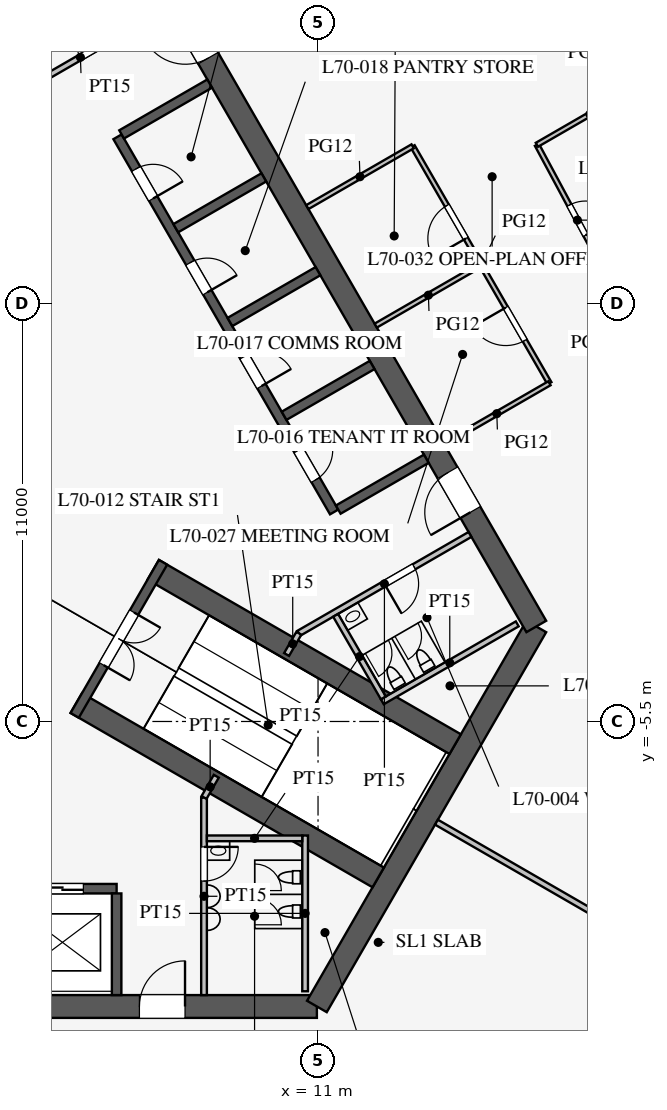
"""IFC4 building model, lengths in metres.
Left out: names, types, materials, properties, quantities, classifications, styles, units other than length and angle.
Written with IfcOpenShell. Run it as: python <this file> out.ifc"""

import sys

from ifc_helpers import new_model, si_unit, direction, frame, frame_2d, origin, place, context, subcontext, project, spatial, rectangle, extrude, element, fill, save


model = new_model("IFC4")
c1 = context("Model", 3, precision=1e-05, world=origin(), true_north=direction((0.0, 1.0)))
c2 = subcontext(c1, "Body", "Model", "MODEL_VIEW")
j1 = project(units=[si_unit("LENGTHUNIT", "METRE"), si_unit("PLANEANGLEUNIT", "RADIAN")], contexts=[c1])
p1 = place(None, origin())
s1 = spatial("IfcSite", under=j1, at=p1, CompositionType="ELEMENT")
p2 = place(p1, origin())
s2 = spatial("IfcBuilding", under=s1, at=p2, CompositionType="ELEMENT")
p3 = place(p2, frame((0.0, 0.0, 305.7)))
s3 = spatial("IfcBuildingStorey", under=s2, at=p3, CompositionType="ELEMENT", Elevation=305.7)
p4 = place(p3, frame((-10.97, -13.0, 0.0), z_axis=(0.0, 0.0, 1.0), x_axis=(1.0, 0.0, 0.0)))
e1 = element("IfcWall", 1, at=p4, inside=s3, PredefinedType="SHEAR", context=c2, shape_type="SweptSolid", body=[
    extrude(rectangle(XDim=21.939, YDim=0.6, at=frame_2d((10.97, 0.0))), origin(), (0.0, 0.0, 1.0), 4.2),
])
p5 = place(p4, frame((17.27, 0.0, 0.0)))
e2 = element("IfcOpeningElement", 2, at=p5, cuts=e1, PredefinedType="OPENING", context=c2, shape_type="SweptSolid", body=[
    extrude(rectangle(XDim=1.2, YDim=2.1, at=frame_2d((0.6, 1.05))), frame((0.0, 0.31, 0.0), z_axis=(0.0, -1.0, 0.0), x_axis=(1.0, 0.0, 0.0)), (0.0, 0.0, 1.0), 0.62),
])
p6 = place(p4, frame((3.47, 0.0, 0.0)))
e3 = element("IfcOpeningElement", 3, at=p6, cuts=e1, PredefinedType="OPENING", context=c2, shape_type="SweptSolid", body=[
    extrude(rectangle(XDim=1.2, YDim=2.1, at=frame_2d((0.6, 1.05))), frame((0.0, 0.31, 0.0), z_axis=(0.0, -1.0, 0.0), x_axis=(1.0, 0.0, 0.0)), (0.0, 0.0, 1.0), 0.62),
])
p7 = place(p3, frame((10.97, -13.0, 0.0), z_axis=(0.0, 0.0, 1.0), x_axis=(0.499995765644, 0.866027848477, 0.0)))
e4 = element("IfcWall", 4, at=p7, inside=s3, PredefinedType="SHEAR", context=c2, shape_type="SweptSolid", body=[
    extrude(rectangle(XDim=11.547, YDim=0.6, at=frame_2d((5.773, 0.0))), origin(), (0.0, 0.0, 1.0), 4.2),
])
p8 = place(p3, frame((16.743, -3.0, 0.0), z_axis=(0.0, 0.0, 1.0), x_axis=(-0.500002442456, 0.866023993627, 0.0)))
e5 = element("IfcWall", 5, at=p8, inside=s3, PredefinedType="SHEAR", context=c2, shape_type="SweptSolid", body=[
    extrude(rectangle(XDim=21.939, YDim=0.6, at=frame_2d((10.97, 0.0))), origin(), (0.0, 0.0, 1.0), 4.2),
])
p9 = place(p8, frame((17.27, 0.0, 0.0)))
e6 = element("IfcOpeningElement", 6, at=p9, cuts=e5, PredefinedType="OPENING", context=c2, shape_type="SweptSolid", body=[
    extrude(rectangle(XDim=1.2, YDim=2.1, at=frame_2d((0.6, 1.05))), frame((0.0, 0.31, 0.0), z_axis=(0.0, -1.0, 0.0), x_axis=(1.0, 0.0, 0.0)), (0.0, 0.0, 1.0), 0.62),
])
p10 = place(p8, frame((3.47, 0.0, 0.0)))
e7 = element("IfcOpeningElement", 7, at=p10, cuts=e5, PredefinedType="OPENING", context=c2, shape_type="SweptSolid", body=[
    extrude(rectangle(XDim=1.2, YDim=2.1, at=frame_2d((0.6, 1.05))), frame((0.0, 0.31, 0.0), z_axis=(0.0, -1.0, 0.0), x_axis=(1.0, 0.0, 0.0)), (0.0, 0.0, 1.0), 0.62),
])
p11 = place(p3, frame((-5.7, -9.9, 0.0), z_axis=(0.0, 0.0, 1.0), x_axis=(1.0, 0.0, 0.0)))
e8 = element("IfcWall", 8, at=p11, inside=s3, PredefinedType="SHEAR", context=c2, shape_type="SweptSolid", body=[
    extrude(rectangle(XDim=11.4, YDim=0.25, at=frame_2d((5.7, 0.0))), origin(), (0.0, 0.0, 1.0), 4.2),
])
p12 = place(p11, frame((0.875, 0.0, 0.0)))
e9 = element("IfcOpeningElement", 9, at=p12, cuts=e8, PredefinedType="OPENING", context=c2, shape_type="SweptSolid", body=[
    extrude(rectangle(XDim=1.1, YDim=2.2, at=frame_2d((0.55, 1.1))), frame((0.0, 0.135, 0.0), z_axis=(0.0, -1.0, 0.0), x_axis=(1.0, 0.0, 0.0)), (0.0, 0.0, 1.0), 0.27),
])
p13 = place(p11, frame((3.725, 0.0, 0.0)))
e10 = element("IfcOpeningElement", 10, at=p13, cuts=e8, PredefinedType="OPENING", context=c2, shape_type="SweptSolid", body=[
    extrude(rectangle(XDim=1.1, YDim=2.2, at=frame_2d((0.55, 1.1))), frame((0.0, 0.135, 0.0), z_axis=(0.0, -1.0, 0.0), x_axis=(1.0, 0.0, 0.0)), (0.0, 0.0, 1.0), 0.27),
])
p14 = place(p11, frame((6.575, 0.0, 0.0)))
e11 = element("IfcOpeningElement", 11, at=p14, cuts=e8, PredefinedType="OPENING", context=c2, shape_type="SweptSolid", body=[
    extrude(rectangle(XDim=1.1, YDim=2.2, at=frame_2d((0.55, 1.1))), frame((0.0, 0.135, 0.0), z_axis=(0.0, -1.0, 0.0), x_axis=(1.0, 0.0, 0.0)), (0.0, 0.0, 1.0), 0.27),
])
p15 = place(p11, frame((9.425, 0.0, 0.0)))
e12 = element("IfcOpeningElement", 12, at=p15, cuts=e8, PredefinedType="OPENING", context=c2, shape_type="SweptSolid", body=[
    extrude(rectangle(XDim=1.1, YDim=2.2, at=frame_2d((0.55, 1.1))), frame((0.0, 0.135, 0.0), z_axis=(0.0, -1.0, 0.0), x_axis=(1.0, 0.0, 0.0)), (0.0, 0.0, 1.0), 0.27),
])
p16 = place(p3, frame((5.7, -10.025, 0.0), z_axis=(0.0, 0.0, 1.0), x_axis=(0.0, -1.0, 0.0)))
e13 = element("IfcWall", 13, at=p16, inside=s3, PredefinedType="SHEAR", context=c2, shape_type="SweptSolid", body=[
    extrude(rectangle(XDim=2.675, YDim=0.25, at=frame_2d((1.337, 0.0))), origin(), (0.0, 0.0, 1.0), 4.2),
])
p17 = place(p3, frame((11.424, 0.014, 0.0), z_axis=(0.0, 0.0, 1.0), x_axis=(-0.500001763848, 0.866024385424, 0.0)))
e14 = element("IfcWall", 14, at=p17, inside=s3, PredefinedType="SHEAR", context=c2, shape_type="SweptSolid", body=[
    extrude(rectangle(XDim=11.4, YDim=0.25, at=frame_2d((5.7, 0.0))), origin(), (0.0, 0.0, 1.0), 4.2),
])
p18 = place(p17, frame((0.975, 0.0, 0.0)))
e15 = element("IfcOpeningElement", 15, at=p18, cuts=e14, PredefinedType="OPENING", context=c2, shape_type="SweptSolid", body=[
    extrude(rectangle(XDim=0.9, YDim=2.1, at=frame_2d((0.45, 1.05))), frame((0.0, 0.135, 0.0), z_axis=(0.0, -1.0, 0.0), x_axis=(1.0, 0.0, 0.0)), (0.0, 0.0, 1.0), 0.27),
])
p19 = place(p17, frame((3.825, 0.0, 0.0)))
e16 = element("IfcOpeningElement", 16, at=p19, cuts=e14, PredefinedType="OPENING", context=c2, shape_type="SweptSolid", body=[
    extrude(rectangle(XDim=0.9, YDim=2.1, at=frame_2d((0.45, 1.05))), frame((0.0, 0.135, 0.0), z_axis=(0.0, -1.0, 0.0), x_axis=(1.0, 0.0, 0.0)), (0.0, 0.0, 1.0), 0.27),
])
p20 = place(p17, frame((6.675, 0.0, 0.0)))
e17 = element("IfcOpeningElement", 17, at=p20, cuts=e14, PredefinedType="OPENING", context=c2, shape_type="SweptSolid", body=[
    extrude(rectangle(XDim=0.9, YDim=2.1, at=frame_2d((0.45, 1.05))), frame((0.0, 0.135, 0.0), z_axis=(0.0, -1.0, 0.0), x_axis=(1.0, 0.0, 0.0)), (0.0, 0.0, 1.0), 0.27),
])
p21 = place(p17, frame((9.525, 0.0, 0.0)))
e18 = element("IfcOpeningElement", 18, at=p21, cuts=e14, PredefinedType="OPENING", context=c2, shape_type="SweptSolid", body=[
    extrude(rectangle(XDim=0.9, YDim=2.1, at=frame_2d((0.45, 1.05))), frame((0.0, 0.135, 0.0), z_axis=(0.0, -1.0, 0.0), x_axis=(1.0, 0.0, 0.0)), (0.0, 0.0, 1.0), 0.27),
])
for number, where, z_axis, x_axis in (
    (19, (11.532, 0.076, 0.0), (0.0, 0.0, 1.0), (0.866, 0.5, 0.0)),
    (20, (10.107, 2.544, 0.0), (0.0, 0.0, 1.0), (0.866, 0.5, 0.0)),
    (21, (8.682, 5.012, 0.0), (0.0, 0.0, 1.0), (0.866, 0.5, 0.0)),
    (22, (7.257, 7.481, 0.0), (0.0, 0.0, 1.0), (0.866, 0.5, 0.0)),
    (23, (5.832, 9.949, 0.0), (0.0, 0.0, 1.0), (0.866, 0.5, 0.0)),
):
    element("IfcWall", number, at=place(p3, frame(where, z_axis=z_axis, x_axis=x_axis)), inside=s3, PredefinedType="SHEAR", context=c2, shape_type="SweptSolid", body=[
        extrude(rectangle(XDim=2.675, YDim=0.25, at=frame_2d((1.337, 0.0))), origin(), (0.0, 0.0, 1.0), 4.2),
    ])
p22 = place(p3, frame((4.638, -5.016, 0.0), z_axis=(0.0, 0.0, 1.0), x_axis=(0.866012320003, -0.50002266109, 0.0)))
e24 = element("IfcWall", 24, at=p22, inside=s3, PredefinedType="SHEAR", context=c2, shape_type="SweptSolid", body=[
    extrude(rectangle(XDim=9.175, YDim=0.6, at=frame_2d((4.587, 0.0))), origin(), (0.0, 0.0, 1.0), 4.2),
])
p23 = place(p3, frame((6.663, -1.509, 0.0), z_axis=(0.0, 0.0, 1.0), x_axis=(0.86603049496, -0.499991181721, 0.0)))
e25 = element("IfcWall", 25, at=p23, inside=s3, PredefinedType="SHEAR", context=c2, shape_type="SweptSolid", body=[
    extrude(rectangle(XDim=9.175, YDim=0.6, at=frame_2d((4.587, 0.0))), origin(), (0.0, 0.0, 1.0), 4.2),
])
p24 = place(p3, frame((4.597, -5.339, 0.0), z_axis=(0.0, 0.0, 1.0), x_axis=(0.499984536904, 0.866034331223, 0.0)))
e26 = element("IfcWall", 26, at=p24, inside=s3, PredefinedType="SHEAR", context=c2, shape_type="SweptSolid", body=[
    extrude(rectangle(XDim=4.65, YDim=0.25, at=frame_2d((2.325, 0.0))), origin(), (0.0, 0.0, 1.0), 4.2),
])
p25 = place(p24, frame((1.525, 0.0, 0.0)))
e27 = element("IfcOpeningElement", 27, at=p25, cuts=e26, PredefinedType="OPENING", context=c2, shape_type="SweptSolid", body=[
    extrude(rectangle(XDim=1.6, YDim=2.1, at=frame_2d((0.8, 1.05))), frame((0.0, 0.135, 0.0), z_axis=(0.0, -1.0, 0.0), x_axis=(1.0, 0.0, 0.0)), (0.0, 0.0, 1.0), 0.27),
])
p26 = place(p3, frame((8.0, -7.5, 0.0), z_axis=(0.0, 0.0, 1.0), x_axis=(0.0, -1.0, 0.0)))
e28 = element("IfcWall", 28, at=p26, inside=s3, PredefinedType="PARTITIONING", context=c2, shape_type="SweptSolid", body=[
    extrude(rectangle(XDim=5.2, YDim=0.15, at=frame_2d((2.6, 0.0))), origin(), (0.0, 0.0, 1.0), 4.0),
])
p27 = place(p26, frame((1.3, 0.0, 0.0)))
e29 = element("IfcOpeningElement", 29, at=p27, cuts=e28, PredefinedType="OPENING", context=c2, shape_type="SweptSolid", body=[
    extrude(rectangle(XDim=0.9, YDim=2.1, at=frame_2d((0.45, 1.05))), frame((0.0, 0.085, 0.0), z_axis=(0.0, -1.0, 0.0), x_axis=(1.0, 0.0, 0.0)), (0.0, 0.0, 1.0), 0.17),
])
p28 = place(p3, frame((2.495, 10.678, 0.0), z_axis=(0.0, 0.0, 1.0), x_axis=(0.866021400173, 0.500006934395, 0.0)))
e30 = element("IfcWall", 30, at=p28, inside=s3, PredefinedType="PARTITIONING", context=c2, shape_type="SweptSolid", body=[
    extrude(rectangle(XDim=5.2, YDim=0.15, at=frame_2d((2.6, 0.0))), origin(), (0.0, 0.0, 1.0), 4.0),
])
p29 = place(p28, frame((2.6, 0.0, 0.0)))
e31 = element("IfcOpeningElement", 31, at=p29, cuts=e30, PredefinedType="OPENING", context=c2, shape_type="SweptSolid", body=[
    extrude(rectangle(XDim=0.9, YDim=2.1, at=frame_2d((0.45, 1.05))), frame((0.0, 0.085, 0.0), z_axis=(0.0, -1.0, 0.0), x_axis=(1.0, 0.0, 0.0)), (0.0, 0.0, 1.0), 0.17),
])
p30 = place(p3, frame((10.495, -3.178, 0.0), z_axis=(0.0, 0.0, 1.0), x_axis=(0.866021400173, 0.500006934395, 0.0)))
e32 = element("IfcWall", 32, at=p30, inside=s3, PredefinedType="PARTITIONING", context=c2, shape_type="SweptSolid", body=[
    extrude(rectangle(XDim=5.2, YDim=0.15, at=frame_2d((2.6, 0.0))), origin(), (0.0, 0.0, 1.0), 4.0),
])
p31 = place(p30, frame((2.6, 0.0, 0.0)))
e33 = element("IfcOpeningElement", 33, at=p31, cuts=e32, PredefinedType="OPENING", context=c2, shape_type="SweptSolid", body=[
    extrude(rectangle(XDim=0.9, YDim=2.1, at=frame_2d((0.45, 1.05))), frame((0.0, 0.085, 0.0), z_axis=(0.0, -1.0, 0.0), x_axis=(1.0, 0.0, 0.0)), (0.0, 0.0, 1.0), 0.17),
])
for number, where, z_axis, x_axis in (
    (34, (8.0, -7.5, 0.0), (0.0, 0.0, 1.0), (0.5, 0.866, 0.0)),
    (35, (10.495, -3.178, 0.0), (0.0, 0.0, 1.0), (-0.5, -0.866, 0.0)),
):
    element("IfcWall", number, at=place(p3, frame(where, z_axis=z_axis, x_axis=x_axis)), inside=s3, PredefinedType="PARTITIONING", context=c2, shape_type="SweptSolid", body=[
        extrude(rectangle(XDim=0.645, YDim=0.15, at=frame_2d((0.323, 0.0))), origin(), (0.0, 0.0, 1.0), 4.0),
    ])
p32 = place(p3, frame((10.66, -8.5, 0.0), z_axis=(0.0, 0.0, 1.0), x_axis=(0.0, -1.0, 0.0)))
e36 = element("IfcWall", 36, at=p32, inside=s3, PredefinedType="PARTITIONING", context=c2, shape_type="SweptSolid", body=[
    extrude(rectangle(XDim=4.1, YDim=0.15, at=frame_2d((2.05, 0.0))), origin(), (0.0, 0.0, 1.0), 4.0),
])
p33 = place(p3, frame((8.075, -8.575, 0.0), z_axis=(0.0, 0.0, 1.0), x_axis=(1.0, 0.0, 0.0)))
e37 = element("IfcWall", 37, at=p33, inside=s3, PredefinedType="PARTITIONING", context=c2, shape_type="SweptSolid", body=[
    extrude(rectangle(XDim=2.51, YDim=0.15, at=frame_2d((1.255, 0.0))), origin(), (0.0, 0.0, 1.0), 4.0),
])
p34 = place(p3, frame((12.691, -4.982, 0.0), z_axis=(0.0, 0.0, 1.0), x_axis=(0.8660249478, 0.500000789788, 0.0)))
e38 = element("IfcWall", 38, at=p34, inside=s3, PredefinedType="PARTITIONING", context=c2, shape_type="SweptSolid", body=[
    extrude(rectangle(XDim=4.1, YDim=0.15, at=frame_2d((2.05, 0.0))), origin(), (0.0, 0.0, 1.0), 4.0),
])
p35 = place(p3, frame((11.464, -2.706, 0.0), z_axis=(0.0, 0.0, 1.0), x_axis=(0.50001992892, -0.866013897511, 0.0)))
e39 = element("IfcWall", 39, at=p35, inside=s3, PredefinedType="PARTITIONING", context=c2, shape_type="SweptSolid", body=[
    extrude(rectangle(XDim=2.51, YDim=0.15, at=frame_2d((1.255, 0.0))), origin(), (0.0, 0.0, 1.0), 4.0),
])
p36 = place(p3, frame((14.116, -8.15, 0.0), z_axis=(0.0, 0.0, 1.0), x_axis=(0.866020541135, -0.500008422262, 0.0)))
e40 = element("IfcWall", 40, at=p36, inside=s3, PredefinedType="PARTITIONING", context=c2, shape_type="SweptSolid", body=[
    extrude(rectangle(XDim=13.45, YDim=0.15, at=frame_2d((6.725, 0.0))), origin(), (0.0, 0.0, 1.0), 2.5),
])
p37 = place(p3, frame((15.289, 6.518, 0.0), z_axis=(0.0, 0.0, 1.0), x_axis=(-0.499961193289, 0.866047807691, 0.0)))
e41 = element("IfcWall", 41, at=p37, inside=s3, PredefinedType="PARTITIONING", context=c2, shape_type="SweptSolid", body=[
    extrude(rectangle(XDim=3.6, YDim=0.12, at=frame_2d((1.8, 0.0))), origin(), (0.0, 0.0, 1.0), 2.9),
])
p38 = place(p37, frame((0.8, 0.0, 0.15)))
e42 = element("IfcOpeningElement", 42, at=p38, cuts=e41, PredefinedType="OPENING", context=c2, shape_type="SweptSolid", body=[
    extrude(rectangle(XDim=1.0, YDim=2.1, at=frame_2d((0.5, 1.05))), frame((0.0, 0.07, 0.0), z_axis=(0.0, -1.0, 0.0), x_axis=(1.0, 0.0, 0.0)), (0.0, 0.0, 1.0), 0.14),
])
p39 = place(p3, frame((17.089, 3.4, 0.0), z_axis=(0.0, 0.0, 1.0), x_axis=(-0.499982693035, 0.866035395735, 0.0)))
e43 = element("IfcWall", 43, at=p39, inside=s3, PredefinedType="PARTITIONING", context=c2, shape_type="SweptSolid", body=[
    extrude(rectangle(XDim=3.6, YDim=0.12, at=frame_2d((1.8, 0.0))), origin(), (0.0, 0.0, 1.0), 2.9),
])
p40 = place(p39, frame((1.3, 0.0, 0.15)))
e44 = element("IfcOpeningElement", 44, at=p40, cuts=e43, PredefinedType="OPENING", context=c2, shape_type="SweptSolid", body=[
    extrude(rectangle(XDim=1.0, YDim=2.1, at=frame_2d((0.5, 1.05))), frame((0.0, 0.07, 0.0), z_axis=(0.0, -1.0, 0.0), x_axis=(1.0, 0.0, 0.0)), (0.0, 0.0, 1.0), 0.14),
])
p41 = place(p3, frame((10.718, 8.036, 0.0), z_axis=(0.0, 0.0, 1.0), x_axis=(0.866028054938, 0.499995408039, 0.0)))
e45 = element("IfcWall", 45, at=p41, inside=s3, PredefinedType="PARTITIONING", context=c2, shape_type="SweptSolid", body=[
    extrude(rectangle(XDim=3.2, YDim=0.12, at=frame_2d((1.6, 0.0))), origin(), (0.0, 0.0, 1.0), 2.9),
])
for number, where, z_axis, x_axis in (
    (46, (12.518, 4.918, 0.0), (0.0, 0.0, 1.0), (0.866, 0.5, 0.0)),
    (47, (14.318, 1.8, 0.0), (0.0, 0.0, 1.0), (0.866, 0.5, 0.0)),
):
    element("IfcWall", number, at=place(p3, frame(where, z_axis=z_axis, x_axis=x_axis)), inside=s3, PredefinedType="PARTITIONING", context=c2, shape_type="SweptSolid", body=[
        extrude(rectangle(XDim=3.2, YDim=0.12, at=frame_2d((1.6, 0.0))), origin(), (0.0, 0.0, 1.0), 2.9),
    ])
p42 = place(p3, frame((18.891, 5.71, 0.0), z_axis=(0.0, 0.0, 1.0), x_axis=(-0.473524102582, 0.880780860529, 0.0)))
e48 = element("IfcWall", 48, at=p42, inside=s3, PredefinedType="PARTITIONING", context=c2, shape_type="SweptSolid", body=[
    extrude(rectangle(XDim=4.502, YDim=0.12, at=frame_2d((2.251, 0.0))), origin(), (0.0, 0.0, 1.0), 2.9),
])
p43 = place(p42, frame((1.8, 0.0, 0.15)))
e49 = element("IfcOpeningElement", 49, at=p43, cuts=e48, PredefinedType="OPENING", context=c2, shape_type="SweptSolid", body=[
    extrude(rectangle(XDim=0.9, YDim=2.1, at=frame_2d((0.45, 1.05))), frame((0.0, 0.07, 0.0), z_axis=(0.0, -1.0, 0.0), x_axis=(1.0, 0.0, 0.0)), (0.0, 0.0, 1.0), 0.14),
])
p44 = place(p3, frame((16.759, 9.676, 0.0), z_axis=(0.0, 0.0, 1.0), x_axis=(0.866008816382, 0.500028729123, 0.0)))
e50 = element("IfcWall", 50, at=p44, inside=s3, PredefinedType="PARTITIONING", context=c2, shape_type="SweptSolid", body=[
    extrude(rectangle(XDim=3.22, YDim=0.12, at=frame_2d((1.61, 0.0))), origin(), (0.0, 0.0, 1.0), 2.9),
])
p45 = place(p27, origin())
e51 = element("IfcDoor", 51, at=p45, inside=s3, OperationType="SINGLE_SWING_LEFT", PredefinedType="DOOR", context=c2, shape_type="SweptSolid", body=[
    extrude(rectangle(XDim=0.9, YDim=2.1, at=frame_2d((0.45, 1.05))), frame((0.0, 0.025, 0.0), z_axis=(0.0, -1.0, 0.0), x_axis=(1.0, 0.0, 0.0)), (0.0, 0.0, 1.0), 0.05),
])
fill(e29, e51)
p46 = place(p29, origin())
e52 = element("IfcDoor", 52, at=p46, inside=s3, OperationType="SINGLE_SWING_RIGHT", PredefinedType="DOOR", context=c2, shape_type="SweptSolid", body=[
    extrude(rectangle(XDim=0.9, YDim=2.1, at=frame_2d((0.45, 1.05))), frame((0.0, 0.025, 0.0), z_axis=(0.0, -1.0, 0.0), x_axis=(1.0, 0.0, 0.0)), (0.0, 0.0, 1.0), 0.05),
])
fill(e31, e52)
p47 = place(p31, frame((0.9, 0.0, 0.0), z_axis=(0.0, 0.0, 1.0), x_axis=(-1.0, 0.0, 0.0)))
e53 = element("IfcDoor", 53, at=p47, inside=s3, OperationType="SINGLE_SWING_RIGHT", PredefinedType="DOOR", context=c2, shape_type="SweptSolid", body=[
    extrude(rectangle(XDim=0.9, YDim=2.1, at=frame_2d((0.45, 1.05))), frame((0.0, 0.025, 0.0), z_axis=(0.0, -1.0, 0.0), x_axis=(1.0, 0.0, 0.0)), (0.0, 0.0, 1.0), 0.05),
])
fill(e33, e53)
p48 = place(p25, frame((1.6, 0.0, 0.0), z_axis=(0.0, 0.0, 1.0), x_axis=(-1.0, 0.0, 0.0)))
e54 = element("IfcDoor", 54, at=p48, inside=s3, OperationType="DOUBLE_DOOR_SINGLE_SWING", PredefinedType="DOOR", context=c2, shape_type="SweptSolid", body=[
    extrude(rectangle(XDim=1.6, YDim=2.1, at=frame_2d((0.8, 1.05))), frame((0.0, 0.025, 0.0), z_axis=(0.0, -1.0, 0.0), x_axis=(1.0, 0.0, 0.0)), (0.0, 0.0, 1.0), 0.05),
])
fill(e27, e54)
p49 = place(p5, origin())
e55 = element("IfcDoor", 55, at=p49, inside=s3, OperationType="SINGLE_SWING_RIGHT", PredefinedType="DOOR", context=c2, shape_type="SweptSolid", body=[
    extrude(rectangle(XDim=1.2, YDim=2.1, at=frame_2d((0.6, 1.05))), frame((0.0, 0.025, 0.0), z_axis=(0.0, -1.0, 0.0), x_axis=(1.0, 0.0, 0.0)), (0.0, 0.0, 1.0), 0.05),
])
fill(e2, e55)
p50 = place(p9, origin())
e56 = element("IfcDoor", 56, at=p50, inside=s3, OperationType="SINGLE_SWING_RIGHT", PredefinedType="DOOR", context=c2, shape_type="SweptSolid", body=[
    extrude(rectangle(XDim=1.2, YDim=2.1, at=frame_2d((0.6, 1.05))), frame((0.0, 0.025, 0.0), z_axis=(0.0, -1.0, 0.0), x_axis=(1.0, 0.0, 0.0)), (0.0, 0.0, 1.0), 0.05),
])
fill(e6, e56)
p51 = place(p10, origin())
e57 = element("IfcDoor", 57, at=p51, inside=s3, OperationType="SINGLE_SWING_LEFT", PredefinedType="DOOR", context=c2, shape_type="SweptSolid", body=[
    extrude(rectangle(XDim=1.2, YDim=2.1, at=frame_2d((0.6, 1.05))), frame((0.0, 0.025, 0.0), z_axis=(0.0, -1.0, 0.0), x_axis=(1.0, 0.0, 0.0)), (0.0, 0.0, 1.0), 0.05),
])
fill(e7, e57)
p52 = place(p18, frame((0.9, 0.0, 0.0), z_axis=(0.0, 0.0, 1.0), x_axis=(-1.0, 0.0, 0.0)))
e58 = element("IfcDoor", 58, at=p52, inside=s3, OperationType="SINGLE_SWING_LEFT", PredefinedType="DOOR", context=c2, shape_type="SweptSolid", body=[
    extrude(rectangle(XDim=0.9, YDim=2.1, at=frame_2d((0.45, 1.05))), frame((0.0, 0.025, 0.0), z_axis=(0.0, -1.0, 0.0), x_axis=(1.0, 0.0, 0.0)), (0.0, 0.0, 1.0), 0.05),
])
fill(e15, e58)
p53 = place(p19, frame((0.9, 0.0, 0.0), z_axis=(0.0, 0.0, 1.0), x_axis=(-1.0, 0.0, 0.0)))
e59 = element("IfcDoor", 59, at=p53, inside=s3, OperationType="SINGLE_SWING_RIGHT", PredefinedType="DOOR", context=c2, shape_type="SweptSolid", body=[
    extrude(rectangle(XDim=0.9, YDim=2.1, at=frame_2d((0.45, 1.05))), frame((0.0, 0.025, 0.0), z_axis=(0.0, -1.0, 0.0), x_axis=(1.0, 0.0, 0.0)), (0.0, 0.0, 1.0), 0.05),
])
fill(e16, e59)
p54 = place(p20, frame((0.9, 0.0, 0.0), z_axis=(0.0, 0.0, 1.0), x_axis=(-1.0, 0.0, 0.0)))
e60 = element("IfcDoor", 60, at=p54, inside=s3, OperationType="SINGLE_SWING_RIGHT", PredefinedType="DOOR", context=c2, shape_type="SweptSolid", body=[
    extrude(rectangle(XDim=0.9, YDim=2.1, at=frame_2d((0.45, 1.05))), frame((0.0, 0.025, 0.0), z_axis=(0.0, -1.0, 0.0), x_axis=(1.0, 0.0, 0.0)), (0.0, 0.0, 1.0), 0.05),
])
fill(e17, e60)
p55 = place(p21, frame((0.9, 0.0, 0.0), z_axis=(0.0, 0.0, 1.0), x_axis=(-1.0, 0.0, 0.0)))
e61 = element("IfcDoor", 61, at=p55, inside=s3, OperationType="SINGLE_SWING_RIGHT", PredefinedType="DOOR", context=c2, shape_type="SweptSolid", body=[
    extrude(rectangle(XDim=0.9, YDim=2.1, at=frame_2d((0.45, 1.05))), frame((0.0, 0.025, 0.0), z_axis=(0.0, -1.0, 0.0), x_axis=(1.0, 0.0, 0.0)), (0.0, 0.0, 1.0), 0.05),
])
fill(e18, e61)
p56 = place(p40, origin())
e62 = element("IfcDoor", 62, at=p56, inside=s3, OperationType="SINGLE_SWING_RIGHT", PredefinedType="DOOR", context=c2, shape_type="SweptSolid", body=[
    extrude(rectangle(XDim=1.0, YDim=2.1, at=frame_2d((0.5, 1.05))), frame((0.0, 0.025, 0.0), z_axis=(0.0, -1.0, 0.0), x_axis=(1.0, 0.0, 0.0)), (0.0, 0.0, 1.0), 0.05),
])
fill(e44, e62)
p57 = place(p38, origin())
e63 = element("IfcDoor", 63, at=p57, inside=s3, OperationType="SINGLE_SWING_LEFT", PredefinedType="DOOR", context=c2, shape_type="SweptSolid", body=[
    extrude(rectangle(XDim=1.0, YDim=2.1, at=frame_2d((0.5, 1.05))), frame((0.0, 0.025, 0.0), z_axis=(0.0, -1.0, 0.0), x_axis=(1.0, 0.0, 0.0)), (0.0, 0.0, 1.0), 0.05),
])
fill(e42, e63)
p58 = place(p43, frame((0.9, 0.0, 0.0), z_axis=(0.0, 0.0, 1.0), x_axis=(-1.0, 0.0, 0.0)))
e64 = element("IfcDoor", 64, at=p58, inside=s3, OperationType="SINGLE_SWING_RIGHT", PredefinedType="DOOR", context=c2, shape_type="SweptSolid", body=[
    extrude(rectangle(XDim=0.9, YDim=2.1, at=frame_2d((0.45, 1.05))), frame((0.0, 0.025, 0.0), z_axis=(0.0, -1.0, 0.0), x_axis=(1.0, 0.0, 0.0)), (0.0, 0.0, 1.0), 0.05),
])
fill(e49, e64)
p59 = place(p15, origin())
e65 = element("IfcDoor", 65, at=p59, inside=s3, OperationType="DOUBLE_DOOR_SLIDING", PredefinedType="DOOR", context=c2, shape_type="SweptSolid", body=[
    extrude(rectangle(XDim=1.1, YDim=2.2, at=frame_2d((0.55, 1.1))), frame((0.0, 0.025, 0.0), z_axis=(0.0, -1.0, 0.0), x_axis=(1.0, 0.0, 0.0)), (0.0, 0.0, 1.0), 0.05),
])
fill(e12, e65)
save(model, sys.argv[1])
